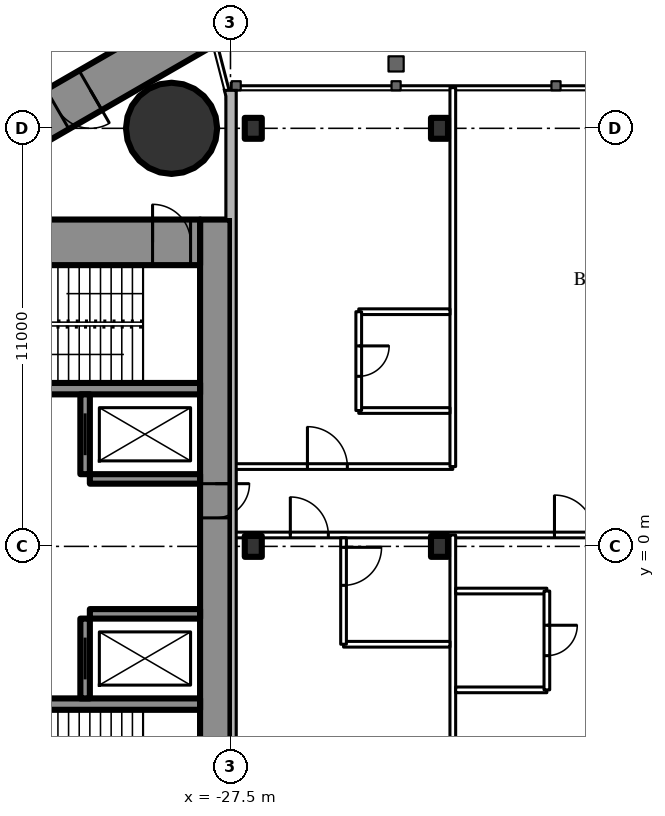
"""IFC4 building model, lengths in metres.
Left out: names, types, materials, properties, quantities, classifications, styles, units other than length and angle.
Written with IfcOpenShell. Run it as: python <this file> out.ifc"""

import sys

from ifc_helpers import new_model, si_unit, direction, frame, frame_2d, origin, origin_2d, place, context, subcontext, project, spatial, rectangle, circle, i_section, extrude, element, fill, save


model = new_model("IFC4")
c1 = context("Model", 3, precision=1e-05, world=origin(), true_north=direction((0.0, 1.0)))
c2 = subcontext(c1, "Body", "Model", "MODEL_VIEW")
j1 = project(units=[si_unit("LENGTHUNIT", "METRE"), si_unit("PLANEANGLEUNIT", "RADIAN")], contexts=[c1])
p1 = place(None, origin())
s1 = spatial("IfcSite", under=j1, at=p1, CompositionType="ELEMENT")
p2 = place(p1, origin())
s2 = spatial("IfcBuilding", under=s1, at=p2, CompositionType="ELEMENT")
p3 = place(p2, frame((0.0, 0.0, 236.9)))
s3 = spatial("IfcBuildingStorey", under=s2, at=p3, CompositionType="ELEMENT", Elevation=236.9)
p4 = place(p3, frame((-29.05, 11.0, 0.0), z_axis=(0.0, 0.0, 1.0), x_axis=(1.0, 0.0, 0.0)))
e1 = element("IfcColumn", 1, at=p4, inside=s3, PredefinedType="COLUMN", context=c2, shape_type="SweptSolid", body=[
    extrude(circle(Radius=1.2, at=origin_2d()), origin(), (0.0, 0.0, 1.0), 3.6),
])
p5 = place(p3, frame((-27.9, 8.6, 0.0), z_axis=(0.0, 0.0, 1.0), x_axis=(0.0, -1.0, 0.0)))
e2 = element("IfcWall", 2, at=p5, inside=s3, PredefinedType="SHEAR", context=c2, shape_type="SweptSolid", body=[
    extrude(rectangle(XDim=17.2, YDim=0.8, at=frame_2d((8.6, 0.0))), origin(), (0.0, 0.0, 1.0), 3.6),
])
p6 = place(p5, frame((6.95, 0.0, 0.0)))
e3 = element("IfcOpeningElement", 3, at=p6, cuts=e2, PredefinedType="OPENING", context=c2, shape_type="SweptSolid", body=[
    extrude(rectangle(XDim=0.9, YDim=2.2, at=frame_2d((0.45, 1.1))), frame((0.0, 0.41, 0.0), z_axis=(0.0, -1.0, 0.0), x_axis=(1.0, 0.0, 0.0)), (0.0, 0.0, 1.0), 0.82),
])
p7 = place(p3, frame((-28.3, 8.0, 0.0), z_axis=(0.0, 0.0, 1.0), x_axis=(-1.0, 0.0, 0.0)))
e4 = element("IfcWall", 4, at=p7, inside=s3, PredefinedType="SHEAR", context=c2, shape_type="SweptSolid", body=[
    extrude(rectangle(XDim=8.4, YDim=1.2, at=frame_2d((4.2, 0.0))), origin(), (0.0, 0.0, 1.0), 3.6),
])
p8 = place(p7, frame((0.25, 0.0, 0.0)))
e5 = element("IfcOpeningElement", 5, at=p8, cuts=e4, PredefinedType="OPENING", context=c2, shape_type="SweptSolid", body=[
    extrude(rectangle(XDim=1.0, YDim=2.2, at=frame_2d((0.5, 1.1))), frame((0.0, 0.61, 0.0), z_axis=(0.0, -1.0, 0.0), x_axis=(1.0, 0.0, 0.0)), (0.0, 0.0, 1.0), 1.22),
])
for number, where, z_axis, x_axis in (
    (6, (-28.3, 4.15, 0.0), (0.0, 0.0, 1.0), (-1.0, 0.0, 0.0)),
    (7, (-28.3, -4.15, 0.0), (0.0, 0.0, 1.0), (-1.0, 0.0, 0.0)),
):
    element("IfcWall", number, at=place(p3, frame(where, z_axis=z_axis, x_axis=x_axis)), inside=s3, PredefinedType="SHEAR", context=c2, shape_type="SweptSolid", body=[
        extrude(rectangle(XDim=8.4, YDim=0.3, at=frame_2d((4.2, 0.0))), origin(), (0.0, 0.0, 1.0), 3.6),
    ])
p9 = place(p3, frame((-31.325, 4.0, 0.0), z_axis=(0.0, 0.0, 1.0), x_axis=(0.0, -1.0, 0.0)))
e8 = element("IfcWall", 8, at=p9, inside=s3, PredefinedType="SHEAR", context=c2, shape_type="SweptSolid", body=[
    extrude(rectangle(XDim=2.1, YDim=0.25, at=frame_2d((1.05, 0.0))), origin(), (0.0, 0.0, 1.0), 3.6),
])
p10 = place(p9, frame((0.5, 0.0, 0.0)))
e9 = element("IfcOpeningElement", 9, at=p10, cuts=e8, PredefinedType="OPENING", context=c2, shape_type="SweptSolid", body=[
    extrude(rectangle(XDim=1.1, YDim=2.2, at=frame_2d((0.55, 1.1))), frame((0.0, 0.135, 0.0), z_axis=(0.0, -1.0, 0.0), x_axis=(1.0, 0.0, 0.0)), (0.0, 0.0, 1.0), 0.27),
])
p11 = place(p3, frame((-28.3, 1.775, 0.0), z_axis=(0.0, 0.0, 1.0), x_axis=(-1.0, 0.0, 0.0)))
e10 = element("IfcWall", 10, at=p11, inside=s3, PredefinedType="SHEAR", context=c2, shape_type="SweptSolid", body=[
    extrude(rectangle(XDim=2.9, YDim=0.25, at=frame_2d((1.45, 0.0))), origin(), (0.0, 0.0, 1.0), 3.6),
])
p12 = place(p3, frame((-31.325, -1.9, 0.0), z_axis=(0.0, 0.0, 1.0), x_axis=(0.0, -1.0, 0.0)))
e11 = element("IfcWall", 11, at=p12, inside=s3, PredefinedType="SHEAR", context=c2, shape_type="SweptSolid", body=[
    extrude(rectangle(XDim=2.1, YDim=0.25, at=frame_2d((1.05, 0.0))), origin(), (0.0, 0.0, 1.0), 3.6),
])
p13 = place(p12, frame((0.5, 0.0, 0.0)))
e12 = element("IfcOpeningElement", 12, at=p13, cuts=e11, PredefinedType="OPENING", context=c2, shape_type="SweptSolid", body=[
    extrude(rectangle(XDim=1.1, YDim=2.2, at=frame_2d((0.55, 1.1))), frame((0.0, 0.135, 0.0), z_axis=(0.0, -1.0, 0.0), x_axis=(1.0, 0.0, 0.0)), (0.0, 0.0, 1.0), 0.27),
])
p14 = place(p3, frame((-28.3, -1.775, 0.0), z_axis=(0.0, 0.0, 1.0), x_axis=(-1.0, 0.0, 0.0)))
e13 = element("IfcWall", 13, at=p14, inside=s3, PredefinedType="SHEAR", context=c2, shape_type="SweptSolid", body=[
    extrude(rectangle(XDim=2.9, YDim=0.25, at=frame_2d((1.45, 0.0))), origin(), (0.0, 0.0, 1.0), 3.6),
])
p15 = place(p3, frame((-27.2, 14.3, 0.0), z_axis=(0.0, 0.0, 1.0), x_axis=(-0.866026593062, -0.499997940104, 0.0)))
e14 = element("IfcWall", 14, at=p15, inside=s3, PredefinedType="SHEAR", context=c2, shape_type="SweptSolid", body=[
    extrude(rectangle(XDim=28.946, YDim=1.2, at=frame_2d((14.473, 0.0))), origin(), (0.0, 0.0, 1.0), 3.6),
])
p16 = place(p15, frame((4.6, 0.0, 0.0)))
e15 = element("IfcOpeningElement", 15, at=p16, cuts=e14, PredefinedType="OPENING", context=c2, shape_type="SweptSolid", body=[
    extrude(rectangle(XDim=1.0, YDim=2.2, at=frame_2d((0.5, 1.1))), frame((0.0, 0.61, 0.0), z_axis=(0.0, -1.0, 0.0), x_axis=(1.0, 0.0, 0.0)), (0.0, 0.0, 1.0), 1.22),
])
p17 = place(p15, frame((13.395, 0.0, 0.0)))
e16 = element("IfcOpeningElement", 16, at=p17, cuts=e14, PredefinedType="OPENING", context=c2, shape_type="SweptSolid", body=[
    extrude(rectangle(XDim=1.8, YDim=2.2, at=frame_2d((0.9, 1.1))), frame((0.0, 0.61, 0.0), z_axis=(0.0, -1.0, 0.0), x_axis=(1.0, 0.0, 0.0)), (0.0, 0.0, 1.0), 1.22),
])
p18 = place(p3, frame((-27.2, -14.3, 0.0), z_axis=(0.0, 0.0, 1.0), x_axis=(-0.866024021859, 0.500002393557, 0.0)))
e17 = element("IfcWall", 17, at=p18, inside=s3, PredefinedType="SHEAR", context=c2, shape_type="SweptSolid", body=[
    extrude(rectangle(XDim=27.907, YDim=1.2, at=frame_2d((13.954, 0.0))), origin(), (0.0, 0.0, 1.0), 3.6),
])
p19 = place(p18, frame((4.6, 0.0, 0.0)))
e18 = element("IfcOpeningElement", 18, at=p19, cuts=e17, PredefinedType="OPENING", context=c2, shape_type="SweptSolid", body=[
    extrude(rectangle(XDim=1.0, YDim=2.2, at=frame_2d((0.5, 1.1))), frame((0.0, 0.61, 0.0), z_axis=(0.0, -1.0, 0.0), x_axis=(1.0, 0.0, 0.0)), (0.0, 0.0, 1.0), 1.22),
])
p20 = place(p18, frame((13.395, 0.0, 0.0)))
e19 = element("IfcOpeningElement", 19, at=p20, cuts=e17, PredefinedType="OPENING", context=c2, shape_type="SweptSolid", body=[
    extrude(rectangle(XDim=1.8, YDim=2.2, at=frame_2d((0.9, 1.1))), frame((0.0, 0.61, 0.0), z_axis=(0.0, -1.0, 0.0), x_axis=(1.0, 0.0, 0.0)), (0.0, 0.0, 1.0), 1.22),
])
for number, where, z_axis, x_axis in (
    (20, (-26.9, 0.0, 0.0), (0.0, 0.0, 1.0), (1.0, 0.0, 0.0)),
    (21, (-22.0, 0.0, 0.0), (0.0, 0.0, 1.0), (1.0, 0.0, 0.0)),
    (22, (-26.9, 11.0, 0.0), (0.0, 0.0, 1.0), (1.0, 0.0, 0.0)),
    (23, (-22.0, 11.0, 0.0), (0.0, 0.0, 1.0), (1.0, 0.0, 0.0)),
):
    element("IfcColumn", number, at=place(p3, frame(where, z_axis=z_axis, x_axis=x_axis)), inside=s3, PredefinedType="COLUMN", context=c2, shape_type="SweptSolid", body=[
        extrude(i_section(OverallWidth=0.448, OverallDepth=0.55, WebThickness=0.072, FlangeThickness=0.115, FilletRadius=0.02, at=origin_2d()), origin(), (0.0, 0.0, 1.0), 3.6),
    ])
p21 = place(p3, frame((-28.737, 16.068, 0.0), z_axis=(0.0, 0.0, 1.0), x_axis=(-0.866026057212, -0.499998868229, 0.0)))
e24 = element("IfcWall", 24, at=p21, inside=s3, PredefinedType="PARTITIONING", context=c2, shape_type="SweptSolid", body=[
    extrude(rectangle(XDim=32.137, YDim=0.2, at=frame_2d((16.068, 0.0))), origin(), (0.0, 0.0, 1.0), 3.35),
])
p22 = place(p21, frame((1.08, 0.0, 0.0)))
e25 = element("IfcOpeningElement", 25, at=p22, cuts=e24, PredefinedType="OPENING", context=c2, shape_type="SweptSolid", body=[
    extrude(rectangle(XDim=1.8, YDim=2.03, at=frame_2d((0.9, 1.015))), frame((0.0, 0.11, 0.0), z_axis=(0.0, -1.0, 0.0), x_axis=(1.0, 0.0, 0.0)), (0.0, 0.0, 1.0), 0.22),
])
p23 = place(p21, frame((6.86, 0.0, 0.0)))
e26 = element("IfcOpeningElement", 26, at=p23, cuts=e24, PredefinedType="OPENING", context=c2, shape_type="SweptSolid", body=[
    extrude(rectangle(XDim=1.0, YDim=2.2, at=frame_2d((0.5, 1.1))), frame((0.0, 0.11, 0.0), z_axis=(0.0, -1.0, 0.0), x_axis=(1.0, 0.0, 0.0)), (0.0, 0.0, 1.0), 0.22),
])
p24 = place(p21, frame((16.418, 0.0, 0.0)))
e27 = element("IfcOpeningElement", 27, at=p24, cuts=e24, PredefinedType="OPENING", context=c2, shape_type="SweptSolid", body=[
    extrude(rectangle(XDim=0.95, YDim=2.2, at=frame_2d((0.475, 1.1))), frame((0.0, 0.11, 0.0), z_axis=(0.0, -1.0, 0.0), x_axis=(1.0, 0.0, 0.0)), (0.0, 0.0, 1.0), 0.22),
])
p25 = place(p21, frame((20.567, 0.0, 0.0)))
e28 = element("IfcOpeningElement", 28, at=p25, cuts=e24, PredefinedType="OPENING", context=c2, shape_type="SweptSolid", body=[
    extrude(rectangle(XDim=0.95, YDim=2.2, at=frame_2d((0.475, 1.1))), frame((0.0, 0.11, 0.0), z_axis=(0.0, -1.0, 0.0), x_axis=(1.0, 0.0, 0.0)), (0.0, 0.0, 1.0), 0.22),
])
p26 = place(p21, frame((27.065, 0.0, 0.0)))
e29 = element("IfcOpeningElement", 29, at=p26, cuts=e24, PredefinedType="OPENING", context=c2, shape_type="SweptSolid", body=[
    extrude(rectangle(XDim=0.95, YDim=2.2, at=frame_2d((0.475, 1.1))), frame((0.0, 0.11, 0.0), z_axis=(0.0, -1.0, 0.0), x_axis=(1.0, 0.0, 0.0)), (0.0, 0.0, 1.0), 0.22),
])
p27 = place(p3, frame((-27.5, 0.3, 0.0), z_axis=(0.0, 0.0, 1.0), x_axis=(1.0, 0.0, 0.0)))
e30 = element("IfcWall", 30, at=p27, inside=s3, PredefinedType="PARTITIONING", context=c2, shape_type="SweptSolid", body=[
    extrude(rectangle(XDim=55.0, YDim=0.15, at=frame_2d((27.5, 0.0))), origin(), (0.0, 0.0, 1.0), 2.4),
])
p28 = place(p27, frame((1.575, 0.0, 0.0)))
e31 = element("IfcOpeningElement", 31, at=p28, cuts=e30, PredefinedType="OPENING", context=c2, shape_type="SweptSolid", body=[
    extrude(rectangle(XDim=1.0, YDim=2.2, at=frame_2d((0.5, 1.1))), frame((0.0, 0.085, 0.0), z_axis=(0.0, -1.0, 0.0), x_axis=(1.0, 0.0, 0.0)), (0.0, 0.0, 1.0), 0.17),
])
p29 = place(p27, frame((8.525, 0.0, 0.0)))
e32 = element("IfcOpeningElement", 32, at=p29, cuts=e30, PredefinedType="OPENING", context=c2, shape_type="SweptSolid", body=[
    extrude(rectangle(XDim=1.05, YDim=2.4, at=frame_2d((0.525, 1.2))), frame((0.0, 0.085, 0.0), z_axis=(0.0, -1.0, 0.0), x_axis=(1.0, 0.0, 0.0)), (0.0, 0.0, 1.0), 0.17),
])
p30 = place(p27, frame((14.025, 0.0, 0.0)))
e33 = element("IfcOpeningElement", 33, at=p30, cuts=e30, PredefinedType="OPENING", context=c2, shape_type="SweptSolid", body=[
    extrude(rectangle(XDim=1.05, YDim=2.4, at=frame_2d((0.525, 1.2))), frame((0.0, 0.085, 0.0), z_axis=(0.0, -1.0, 0.0), x_axis=(1.0, 0.0, 0.0)), (0.0, 0.0, 1.0), 0.17),
])
p31 = place(p27, frame((25.025, 0.0, 0.0)))
e34 = element("IfcOpeningElement", 34, at=p31, cuts=e30, PredefinedType="OPENING", context=c2, shape_type="SweptSolid", body=[
    extrude(rectangle(XDim=1.05, YDim=2.4, at=frame_2d((0.525, 1.2))), frame((0.0, 0.085, 0.0), z_axis=(0.0, -1.0, 0.0), x_axis=(1.0, 0.0, 0.0)), (0.0, 0.0, 1.0), 0.17),
])
p32 = place(p27, frame((30.525, 0.0, 0.0)))
e35 = element("IfcOpeningElement", 35, at=p32, cuts=e30, PredefinedType="OPENING", context=c2, shape_type="SweptSolid", body=[
    extrude(rectangle(XDim=1.05, YDim=2.4, at=frame_2d((0.525, 1.2))), frame((0.0, 0.085, 0.0), z_axis=(0.0, -1.0, 0.0), x_axis=(1.0, 0.0, 0.0)), (0.0, 0.0, 1.0), 0.17),
])
p33 = place(p27, frame((41.525, 0.0, 0.0)))
e36 = element("IfcOpeningElement", 36, at=p33, cuts=e30, PredefinedType="OPENING", context=c2, shape_type="SweptSolid", body=[
    extrude(rectangle(XDim=1.05, YDim=2.4, at=frame_2d((0.525, 1.2))), frame((0.0, 0.085, 0.0), z_axis=(0.0, -1.0, 0.0), x_axis=(1.0, 0.0, 0.0)), (0.0, 0.0, 1.0), 0.17),
])
p34 = place(p27, frame((47.025, 0.0, 0.0)))
e37 = element("IfcOpeningElement", 37, at=p34, cuts=e30, PredefinedType="OPENING", context=c2, shape_type="SweptSolid", body=[
    extrude(rectangle(XDim=1.05, YDim=2.4, at=frame_2d((0.525, 1.2))), frame((0.0, 0.085, 0.0), z_axis=(0.0, -1.0, 0.0), x_axis=(1.0, 0.0, 0.0)), (0.0, 0.0, 1.0), 0.17),
])
p35 = place(p27, frame((52.525, 0.0, 0.0)))
e38 = element("IfcOpeningElement", 38, at=p35, cuts=e30, PredefinedType="OPENING", context=c2, shape_type="SweptSolid", body=[
    extrude(rectangle(XDim=1.05, YDim=2.4, at=frame_2d((0.525, 1.2))), frame((0.0, 0.085, 0.0), z_axis=(0.0, -1.0, 0.0), x_axis=(1.0, 0.0, 0.0)), (0.0, 0.0, 1.0), 0.17),
])
p36 = place(p3, frame((-27.5, 2.1, 0.0), z_axis=(0.0, 0.0, 1.0), x_axis=(1.0, 0.0, 0.0)))
e39 = element("IfcWall", 39, at=p36, inside=s3, PredefinedType="PARTITIONING", context=c2, shape_type="SweptSolid", body=[
    extrude(rectangle(XDim=5.85, YDim=0.15, at=frame_2d((2.925, 0.0))), origin(), (0.0, 0.0, 1.0), 3.4),
])
p37 = place(p36, frame((2.025, 0.0, 0.0)))
e40 = element("IfcOpeningElement", 40, at=p37, cuts=e39, PredefinedType="OPENING", context=c2, shape_type="SweptSolid", body=[
    extrude(rectangle(XDim=1.05, YDim=2.4, at=frame_2d((0.525, 1.2))), frame((0.0, 0.085, 0.0), z_axis=(0.0, -1.0, 0.0), x_axis=(1.0, 0.0, 0.0)), (0.0, 0.0, 1.0), 0.17),
])
p38 = place(p3, frame((-21.65, -12.07, 0.0), z_axis=(0.0, 0.0, 1.0), x_axis=(0.0, 1.0, 0.0)))
e41 = element("IfcWall", 41, at=p38, inside=s3, PredefinedType="PARTITIONING", context=c2, shape_type="SweptSolid", body=[
    extrude(rectangle(XDim=12.37, YDim=0.15, at=frame_2d((6.185, 0.0))), origin(), (0.0, 0.0, 1.0), 3.4),
])
p39 = place(p3, frame((-24.525, -2.575, 0.0), z_axis=(0.0, 0.0, 1.0), x_axis=(1.0, 0.0, 0.0)))
e42 = element("IfcWall", 42, at=p39, inside=s3, PredefinedType="PARTITIONING", context=c2, shape_type="SweptSolid", body=[
    extrude(rectangle(XDim=2.8, YDim=0.15, at=frame_2d((1.4, 0.0))), origin(), (0.0, 0.0, 1.0), 3.4),
])
p40 = place(p3, frame((-24.525, -2.575, 0.0), z_axis=(0.0, 0.0, 1.0), x_axis=(0.0, 1.0, 0.0)))
e43 = element("IfcWall", 43, at=p40, inside=s3, PredefinedType="PARTITIONING", context=c2, shape_type="SweptSolid", body=[
    extrude(rectangle(XDim=2.8, YDim=0.15, at=frame_2d((1.4, 0.0))), origin(), (0.0, 0.0, 1.0), 3.4),
])
p41 = place(p40, frame((1.55, 0.0, 0.0)))
e44 = element("IfcOpeningElement", 44, at=p41, cuts=e43, PredefinedType="OPENING", context=c2, shape_type="SweptSolid", body=[
    extrude(rectangle(XDim=1.0, YDim=2.2, at=frame_2d((0.5, 1.1))), frame((0.0, 0.085, 0.0), z_axis=(0.0, -1.0, 0.0), x_axis=(1.0, 0.0, 0.0)), (0.0, 0.0, 1.0), 0.17),
])
for number, where, z_axis, x_axis in (
    (45, (-21.575, -3.775, 0.0), (0.0, 0.0, 1.0), (1.0, 0.0, 0.0)),
    (46, (-21.575, -1.175, 0.0), (0.0, 0.0, 1.0), (1.0, 0.0, 0.0)),
):
    element("IfcWall", number, at=place(p3, frame(where, z_axis=z_axis, x_axis=x_axis)), inside=s3, PredefinedType="PARTITIONING", context=c2, shape_type="SweptSolid", body=[
        extrude(rectangle(XDim=2.4, YDim=0.15, at=frame_2d((1.2, 0.0))), origin(), (0.0, 0.0, 1.0), 3.4),
    ])
p42 = place(p3, frame((-19.175, -3.775, 0.0), z_axis=(0.0, 0.0, 1.0), x_axis=(0.0, 1.0, 0.0)))
e47 = element("IfcWall", 47, at=p42, inside=s3, PredefinedType="PARTITIONING", context=c2, shape_type="SweptSolid", body=[
    extrude(rectangle(XDim=2.6, YDim=0.15, at=frame_2d((1.3, 0.0))), origin(), (0.0, 0.0, 1.0), 3.4),
])
p43 = place(p42, frame((0.9, 0.0, 0.0)))
e48 = element("IfcOpeningElement", 48, at=p43, cuts=e47, PredefinedType="OPENING", context=c2, shape_type="SweptSolid", body=[
    extrude(rectangle(XDim=0.8, YDim=2.2, at=frame_2d((0.4, 1.1))), frame((0.0, 0.085, 0.0), z_axis=(0.0, -1.0, 0.0), x_axis=(1.0, 0.0, 0.0)), (0.0, 0.0, 1.0), 0.17),
])
p44 = place(p3, frame((-21.65, 2.1, 0.0), z_axis=(0.0, 0.0, 1.0), x_axis=(0.0, 1.0, 0.0)))
e49 = element("IfcWall", 49, at=p44, inside=s3, PredefinedType="PARTITIONING", context=c2, shape_type="SweptSolid", body=[
    extrude(rectangle(XDim=9.97, YDim=0.15, at=frame_2d((4.985, 0.0))), origin(), (0.0, 0.0, 1.0), 3.4),
])
for number, where, z_axis, x_axis in (
    (50, (-24.125, 6.175, 0.0), (0.0, 0.0, 1.0), (1.0, 0.0, 0.0)),
    (51, (-24.125, 3.575, 0.0), (0.0, 0.0, 1.0), (1.0, 0.0, 0.0)),
):
    element("IfcWall", number, at=place(p3, frame(where, z_axis=z_axis, x_axis=x_axis)), inside=s3, PredefinedType="PARTITIONING", context=c2, shape_type="SweptSolid", body=[
        extrude(rectangle(XDim=2.4, YDim=0.15, at=frame_2d((1.2, 0.0))), origin(), (0.0, 0.0, 1.0), 3.4),
    ])
p45 = place(p3, frame((-24.125, 3.575, 0.0), z_axis=(0.0, 0.0, 1.0), x_axis=(0.0, 1.0, 0.0)))
e52 = element("IfcWall", 52, at=p45, inside=s3, PredefinedType="PARTITIONING", context=c2, shape_type="SweptSolid", body=[
    extrude(rectangle(XDim=2.6, YDim=0.15, at=frame_2d((1.3, 0.0))), origin(), (0.0, 0.0, 1.0), 3.4),
])
p46 = place(p45, frame((0.9, 0.0, 0.0)))
e53 = element("IfcOpeningElement", 53, at=p46, cuts=e52, PredefinedType="OPENING", context=c2, shape_type="SweptSolid", body=[
    extrude(rectangle(XDim=0.8, YDim=2.2, at=frame_2d((0.4, 1.1))), frame((0.0, 0.085, 0.0), z_axis=(0.0, -1.0, 0.0), x_axis=(1.0, 0.0, 0.0)), (0.0, 0.0, 1.0), 0.17),
])
p47 = place(p16, origin())
e54 = element("IfcDoor", 54, at=p47, inside=s3, OperationType="SINGLE_SWING_LEFT", PredefinedType="DOOR", context=c2, shape_type="SweptSolid", body=[
    extrude(rectangle(XDim=1.0, YDim=2.2, at=frame_2d((0.5, 1.1))), frame((0.0, 0.025, 0.0), z_axis=(0.0, -1.0, 0.0), x_axis=(1.0, 0.0, 0.0)), (0.0, 0.0, 1.0), 0.05),
])
fill(e15, e54)
p48 = place(p8, origin())
e55 = element("IfcDoor", 55, at=p48, inside=s3, OperationType="SINGLE_SWING_RIGHT", PredefinedType="DOOR", context=c2, shape_type="SweptSolid", body=[
    extrude(rectangle(XDim=1.0, YDim=2.2, at=frame_2d((0.5, 1.1))), frame((0.0, 0.025, 0.0), z_axis=(0.0, -1.0, 0.0), x_axis=(1.0, 0.0, 0.0)), (0.0, 0.0, 1.0), 0.05),
])
fill(e5, e55)
p49 = place(p6, origin())
e56 = element("IfcDoor", 56, at=p49, inside=s3, OperationType="SINGLE_SWING_LEFT", PredefinedType="DOOR", context=c2, shape_type="SweptSolid", body=[
    extrude(rectangle(XDim=0.9, YDim=2.2, at=frame_2d((0.45, 1.1))), frame((0.0, 0.025, 0.0), z_axis=(0.0, -1.0, 0.0), x_axis=(1.0, 0.0, 0.0)), (0.0, 0.0, 1.0), 0.05),
])
fill(e3, e56)
p50 = place(p41, origin())
e57 = element("IfcDoor", 57, at=p50, inside=s3, OperationType="SINGLE_SWING_RIGHT", PredefinedType="DOOR", context=c2, shape_type="SweptSolid", body=[
    extrude(rectangle(XDim=1.0, YDim=2.2, at=frame_2d((0.5, 1.1))), frame((0.0, 0.025, 0.0), z_axis=(0.0, -1.0, 0.0), x_axis=(1.0, 0.0, 0.0)), (0.0, 0.0, 1.0), 0.05),
])
fill(e44, e57)
p51 = place(p28, origin())
e58 = element("IfcDoor", 58, at=p51, inside=s3, OperationType="SINGLE_SWING_LEFT", PredefinedType="DOOR", context=c2, shape_type="SweptSolid", body=[
    extrude(rectangle(XDim=1.0, YDim=2.2, at=frame_2d((0.5, 1.1))), frame((0.0, 0.025, 0.0), z_axis=(0.0, -1.0, 0.0), x_axis=(1.0, 0.0, 0.0)), (0.0, 0.0, 1.0), 0.05),
])
fill(e31, e58)
p52 = place(p43, origin())
e59 = element("IfcDoor", 59, at=p52, inside=s3, OperationType="SINGLE_SWING_RIGHT", PredefinedType="DOOR", context=c2, shape_type="SweptSolid", body=[
    extrude(rectangle(XDim=0.8, YDim=2.2, at=frame_2d((0.4, 1.1))), frame((0.0, 0.025, 0.0), z_axis=(0.0, -1.0, 0.0), x_axis=(1.0, 0.0, 0.0)), (0.0, 0.0, 1.0), 0.05),
])
fill(e48, e59)
p53 = place(p29, origin())
e60 = element("IfcDoor", 60, at=p53, inside=s3, OperationType="SINGLE_SWING_LEFT", PredefinedType="DOOR", context=c2, shape_type="SweptSolid", body=[
    extrude(rectangle(XDim=1.05, YDim=2.4, at=frame_2d((0.525, 1.2))), frame((0.0, 0.025, 0.0), z_axis=(0.0, -1.0, 0.0), x_axis=(1.0, 0.0, 0.0)), (0.0, 0.0, 1.0), 0.05),
])
fill(e32, e60)
p54 = place(p46, origin())
e61 = element("IfcDoor", 61, at=p54, inside=s3, OperationType="SINGLE_SWING_RIGHT", PredefinedType="DOOR", context=c2, shape_type="SweptSolid", body=[
    extrude(rectangle(XDim=0.8, YDim=2.2, at=frame_2d((0.4, 1.1))), frame((0.0, 0.025, 0.0), z_axis=(0.0, -1.0, 0.0), x_axis=(1.0, 0.0, 0.0)), (0.0, 0.0, 1.0), 0.05),
])
fill(e53, e61)
p55 = place(p37, origin())
e62 = element("IfcDoor", 62, at=p55, inside=s3, OperationType="SINGLE_SWING_LEFT", PredefinedType="DOOR", context=c2, shape_type="SweptSolid", body=[
    extrude(rectangle(XDim=1.05, YDim=2.4, at=frame_2d((0.525, 1.2))), frame((0.0, 0.025, 0.0), z_axis=(0.0, -1.0, 0.0), x_axis=(1.0, 0.0, 0.0)), (0.0, 0.0, 1.0), 0.05),
])
fill(e40, e62)
p56 = place(p10, origin())
e63 = element("IfcDoor", 63, at=p56, inside=s3, OperationType="SLIDING_TO_LEFT", PredefinedType="USERDEFINED", context=c2, shape_type="SweptSolid", body=[
    extrude(rectangle(XDim=1.1, YDim=2.2, at=frame_2d((0.55, 1.1))), frame((0.0, 0.025, 0.0), z_axis=(0.0, -1.0, 0.0), x_axis=(1.0, 0.0, 0.0)), (0.0, 0.0, 1.0), 0.05),
])
fill(e9, e63)
p57 = place(p13, origin())
e64 = element("IfcDoor", 64, at=p57, inside=s3, OperationType="SLIDING_TO_LEFT", PredefinedType="USERDEFINED", context=c2, shape_type="SweptSolid", body=[
    extrude(rectangle(XDim=1.1, YDim=2.2, at=frame_2d((0.55, 1.1))), frame((0.0, 0.025, 0.0), z_axis=(0.0, -1.0, 0.0), x_axis=(1.0, 0.0, 0.0)), (0.0, 0.0, 1.0), 0.05),
])
fill(e12, e64)
save(model, sys.argv[1])
